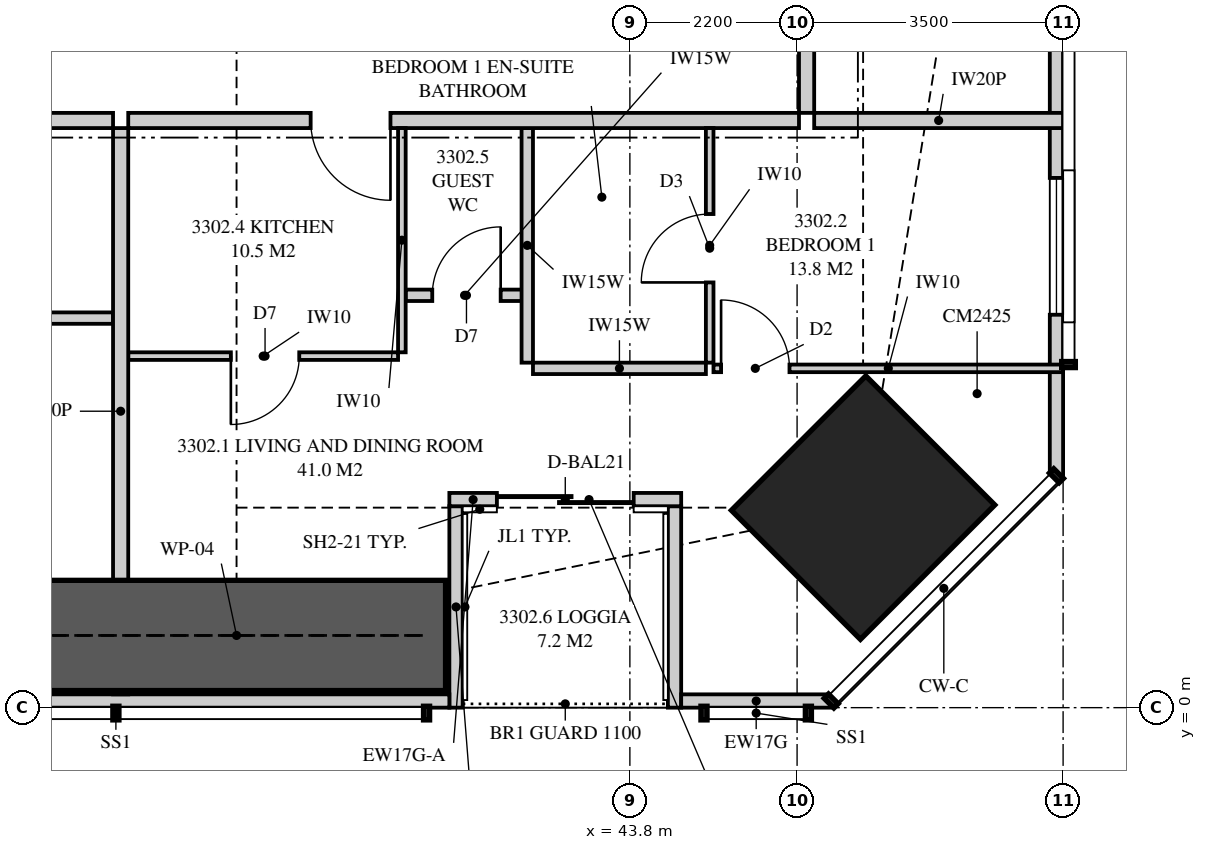
"""IFC4 building model, lengths in metres.
Left out: names, types, materials, properties, quantities, classifications, styles, units other than length and angle.
Written with IfcOpenShell. Run it as: python <this file> out.ifc"""

import sys

from ifc_helpers import new_model, si_unit, direction, frame, frame_2d, origin, origin_2d, place, context, subcontext, project, spatial, polyline, rectangle, outline, extrude, element, fill, save


model = new_model("IFC4")
c1 = context("Model", 3, precision=1e-05, world=origin(), true_north=direction((0.0, 1.0)))
c2 = subcontext(c1, "Body", "Model", "MODEL_VIEW")
j1 = project(units=[si_unit("LENGTHUNIT", "METRE"), si_unit("PLANEANGLEUNIT", "RADIAN")], contexts=[c1])
p1 = place(None, origin())
s1 = spatial("IfcSite", under=j1, at=p1, CompositionType="ELEMENT")
p2 = place(p1, origin())
s2 = spatial("IfcBuilding", under=s1, at=p2, CompositionType="ELEMENT")
p3 = place(p2, frame((0.0, 0.0, 121.6)))
s3 = spatial("IfcBuildingStorey", under=s2, at=p3, CompositionType="ELEMENT", Elevation=121.6)
p4 = place(p3, frame((46.869, 2.631, 0.0), z_axis=(0.0, 0.0, 1.0), x_axis=(-0.707106781187, 0.707106781187, 0.0)))
e1 = element("IfcColumn", 1, at=p4, inside=s3, PredefinedType="COLUMN", context=c2, shape_type="SweptSolid", body=[
    extrude(rectangle(XDim=2.4, YDim=2.5, at=origin_2d()), origin(), (0.0, 0.0, 1.0), 3.35),
])
p5 = place(p3, frame((14.051, 0.087, 0.0), z_axis=(0.0, 0.0, 1.0), x_axis=(1.0, 0.0, 0.0)))
e2 = element("IfcWall", 2, at=p5, inside=s3, PredefinedType="SOLIDWALL", context=c2, shape_type="SweptSolid", body=[
    extrude(outline(polyline([(0.0, 0.0), (27.374, 0.0), (27.374, 3.11), (24.777, 3.11), (24.777, 2.15), (24.732, 2.15), (24.732, 3.11), (24.574, 3.11), (24.574, 2.15), (2.824, 2.15), (2.824, 3.11), (2.666, 3.11), (2.666, 2.15), (2.62, 2.15), (2.62, 3.11), (0.0, 3.11), (0.0, 0.0)])), frame((0.0, 0.087, 0.0), z_axis=(0.0, -1.0, 0.0), x_axis=(1.0, 0.0, 0.0)), (0.0, 0.0, 1.0), 0.175),
])
p6 = place(p5, frame((5.874, 0.0, 0.4)))
e3 = element("IfcOpeningElement", 3, at=p6, cuts=e2, PredefinedType="OPENING", context=c2, shape_type="SweptSolid", body=[
    extrude(rectangle(XDim=1.8, YDim=1.7, at=frame_2d((0.9, 0.85))), frame((0.0, 0.097, 0.0), z_axis=(0.0, -1.0, 0.0), x_axis=(1.0, 0.0, 0.0)), (0.0, 0.0, 1.0), 0.195),
])
p7 = place(p5, frame((9.04, 0.0, 0.4)))
e4 = element("IfcOpeningElement", 4, at=p7, cuts=e2, PredefinedType="OPENING", context=c2, shape_type="SweptSolid", body=[
    extrude(rectangle(XDim=1.8, YDim=1.7, at=frame_2d((0.9, 0.85))), frame((0.0, 0.097, 0.0), z_axis=(0.0, -1.0, 0.0), x_axis=(1.0, 0.0, 0.0)), (0.0, 0.0, 1.0), 0.195),
])
p8 = place(p5, frame((16.564, 0.0, 0.4)))
e5 = element("IfcOpeningElement", 5, at=p8, cuts=e2, PredefinedType="OPENING", context=c2, shape_type="SweptSolid", body=[
    extrude(rectangle(XDim=1.8, YDim=1.7, at=frame_2d((0.9, 0.85))), frame((0.0, 0.097, 0.0), z_axis=(0.0, -1.0, 0.0), x_axis=(1.0, 0.0, 0.0)), (0.0, 0.0, 1.0), 0.195),
])
p9 = place(p5, frame((19.889, 0.0, 0.4)))
e6 = element("IfcOpeningElement", 6, at=p9, cuts=e2, PredefinedType="OPENING", context=c2, shape_type="SweptSolid", body=[
    extrude(rectangle(XDim=1.8, YDim=1.7, at=frame_2d((0.9, 0.85))), frame((0.0, 0.097, 0.0), z_axis=(0.0, -1.0, 0.0), x_axis=(1.0, 0.0, 0.0)), (0.0, 0.0, 1.0), 0.195),
])
p10 = place(p3, frame((44.475, 0.087, 0.0), z_axis=(0.0, 0.0, 1.0), x_axis=(1.0, 0.0, 0.0)))
e7 = element("IfcWall", 7, at=p10, inside=s3, PredefinedType="SOLIDWALL", context=c2, shape_type="SweptSolid", body=[
    extrude(rectangle(XDim=1.974, YDim=0.175, at=frame_2d((0.987, 0.0))), origin(), (0.0, 0.0, 1.0), 3.11),
])
p11 = place(p3, frame((41.425, 2.738, 0.0), z_axis=(0.0, 0.0, 1.0), x_axis=(1.0, 0.0, 0.0)))
e8 = element("IfcWall", 8, at=p11, inside=s3, PredefinedType="SOLIDWALL", context=c2, shape_type="SweptSolid", body=[
    extrude(rectangle(XDim=0.625, YDim=0.175, at=frame_2d((0.312, 0.0))), origin(), (0.0, 0.0, 1.0), 2.51),
])
p12 = place(p3, frame((42.05, 2.738, 0.0), z_axis=(0.0, 0.0, 1.0), x_axis=(1.0, 0.0, 0.0)))
e9 = element("IfcWall", 9, at=p12, inside=s3, PredefinedType="SOLIDWALL", context=c2, shape_type="SweptSolid", body=[
    extrude(rectangle(XDim=2.425, YDim=0.175, at=frame_2d((1.212, 0.0))), origin(), (0.0, 0.0, 1.0), 2.15),
])
p13 = place(p12, origin())
e10 = element("IfcOpeningElement", 10, at=p13, cuts=e9, PredefinedType="OPENING", context=c2, shape_type="SweptSolid", body=[
    extrude(rectangle(XDim=1.8, YDim=2.1, at=frame_2d((0.9, 1.05))), frame((0.0, 0.097, 0.0), z_axis=(0.0, -1.0, 0.0), x_axis=(1.0, 0.0, 0.0)), (0.0, 0.0, 1.0), 0.195),
])
p14 = place(p3, frame((41.512, 0.0, 0.0), z_axis=(0.0, 0.0, 1.0), x_axis=(0.0, 1.0, 0.0)))
e11 = element("IfcWall", 11, at=p14, inside=s3, PredefinedType="SOLIDWALL", context=c2, shape_type="SweptSolid", body=[
    extrude(outline(polyline([(0.0, 0.0), (2.65, 0.0), (2.65, 2.51), (2.373, 2.51), (2.373, 2.15), (0.705, 2.15), (0.705, 3.11), (0.0, 3.11), (0.0, 0.0)])), frame((0.0, 0.087, 0.0), z_axis=(0.0, -1.0, 0.0), x_axis=(1.0, 0.0, 0.0)), (0.0, 0.0, 1.0), 0.175),
])
p15 = place(p3, frame((44.387, 0.0, 0.0), z_axis=(0.0, 0.0, 1.0), x_axis=(0.0, 1.0, 0.0)))
e12 = element("IfcWall", 12, at=p15, inside=s3, PredefinedType="SOLIDWALL", context=c2, shape_type="SweptSolid", body=[
    extrude(outline(polyline([(0.0, 0.0), (2.65, 0.0), (2.65, 2.15), (1.291, 2.15), (1.291, 3.11), (0.0, 3.11), (0.0, 0.0)])), frame((0.0, 0.087, 0.0), z_axis=(0.0, -1.0, 0.0), x_axis=(1.0, 0.0, 0.0)), (0.0, 0.0, 1.0), 0.175),
])
p16 = place(p3, frame((49.413, 3.051, 0.0), z_axis=(0.0, 0.0, 1.0), x_axis=(0.0, 1.0, 0.0)))
e13 = element("IfcWall", 13, at=p16, inside=s3, PredefinedType="SOLIDWALL", context=c2, shape_type="SweptSolid", body=[
    extrude(outline(polyline([(0.0, 0.0), (31.897, 0.0), (31.897, 3.11), (22.167, 3.11), (22.167, 2.15), (22.074, 2.15), (22.074, 3.11), (21.949, 3.11), (21.949, 2.15), (9.949, 2.15), (9.949, 3.11), (9.823, 3.11), (9.823, 2.15), (9.73, 2.15), (9.73, 3.11), (0.0, 3.11), (0.0, 0.0)])), frame((0.0, 0.087, 0.0), z_axis=(0.0, -1.0, 0.0), x_axis=(1.0, 0.0, 0.0)), (0.0, 0.0, 1.0), 0.175),
])
p17 = place(p16, frame((2.118, 0.0, 0.4)))
e14 = element("IfcOpeningElement", 14, at=p17, cuts=e13, PredefinedType="OPENING", context=c2, shape_type="SweptSolid", body=[
    extrude(rectangle(XDim=1.8, YDim=1.7, at=frame_2d((0.9, 0.85))), frame((0.0, 0.097, 0.0), z_axis=(0.0, -1.0, 0.0), x_axis=(1.0, 0.0, 0.0)), (0.0, 0.0, 1.0), 0.195),
])
p18 = place(p16, frame((14.849, 0.0, 0.4)))
e15 = element("IfcOpeningElement", 15, at=p18, cuts=e13, PredefinedType="OPENING", context=c2, shape_type="SweptSolid", body=[
    extrude(rectangle(XDim=1.2, YDim=1.7, at=frame_2d((0.6, 0.85))), frame((0.0, 0.097, 0.0), z_axis=(0.0, -1.0, 0.0), x_axis=(1.0, 0.0, 0.0)), (0.0, 0.0, 1.0), 0.195),
])
p19 = place(p16, frame((27.479, 0.0, 0.4)))
e16 = element("IfcOpeningElement", 16, at=p19, cuts=e13, PredefinedType="OPENING", context=c2, shape_type="SweptSolid", body=[
    extrude(rectangle(XDim=1.8, YDim=1.7, at=frame_2d((0.9, 0.85))), frame((0.0, 0.097, 0.0), z_axis=(0.0, -1.0, 0.0), x_axis=(1.0, 0.0, 0.0)), (0.0, 0.0, 1.0), 0.195),
])
p20 = place(p3, frame((37.1, 0.175, 0.0), z_axis=(0.0, 0.0, 1.0), x_axis=(0.0, 1.0, 0.0)))
e17 = element("IfcWall", 17, at=p20, inside=s3, PredefinedType="PARTITIONING", context=c2, shape_type="SweptSolid", body=[
    extrude(outline(polyline([(0.529, 2.15), (0.0, 2.15), (0.0, 0.0), (0.529, 0.0), (0.529, 0.461), (1.021, 0.461), (1.021, 0.0), (7.45, 0.0), (7.45, 3.11), (1.685, 3.11), (1.685, 2.15), (1.021, 2.15), (1.021, 1.688), (0.529, 1.688), (0.529, 2.15)])), frame((0.0, 0.1, 0.0), z_axis=(0.0, -1.0, 0.0), x_axis=(1.0, 0.0, 0.0)), (0.0, 0.0, 1.0), 0.2),
])
p21 = place(p3, frame((17.775, 7.725, 0.0), z_axis=(0.0, 0.0, 1.0), x_axis=(1.0, 0.0, 0.0)))
e18 = element("IfcWall", 18, at=p21, inside=s3, PredefinedType="PARTITIONING", context=c2, shape_type="SweptSolid", body=[
    extrude(outline(polyline([(0.0, 0.0), (19.225, 0.0), (19.225, 3.11), (10.312, 3.11), (10.312, 2.541), (9.638, 2.541), (9.638, 3.11), (0.0, 3.11), (0.0, 0.0)])), frame((0.0, 0.1, 0.0), z_axis=(0.0, -1.0, 0.0), x_axis=(1.0, 0.0, 0.0)), (0.0, 0.0, 1.0), 0.2),
])
p22 = place(p21, frame((3.275, 0.0, 0.0)))
e19 = element("IfcOpeningElement", 19, at=p22, cuts=e18, PredefinedType="OPENING", context=c2, shape_type="SweptSolid", body=[
    extrude(rectangle(XDim=1.05, YDim=2.2, at=frame_2d((0.525, 1.1))), frame((0.0, 0.11, 0.0), z_axis=(0.0, -1.0, 0.0), x_axis=(1.0, 0.0, 0.0)), (0.0, 0.0, 1.0), 0.22),
])
p23 = place(p3, frame((32.95, 5.125, 0.0), z_axis=(0.0, 0.0, 1.0), x_axis=(1.0, 0.0, 0.0)))
e20 = element("IfcWall", 20, at=p23, inside=s3, PredefinedType="PLUMBINGWALL", context=c2, shape_type="SweptSolid", body=[
    extrude(rectangle(XDim=4.05, YDim=0.15, at=frame_2d((2.025, 0.0))), origin(), (0.0, 0.0, 1.0), 3.11),
])
p24 = place(p23, frame((0.4, 0.0, 0.0)))
e21 = element("IfcOpeningElement", 21, at=p24, cuts=e20, PredefinedType="OPENING", context=c2, shape_type="SweptSolid", body=[
    extrude(rectangle(XDim=0.9, YDim=2.1, at=frame_2d((0.45, 1.05))), frame((0.0, 0.085, 0.0), z_axis=(0.0, -1.0, 0.0), x_axis=(1.0, 0.0, 0.0)), (0.0, 0.0, 1.0), 0.17),
])
p25 = place(p3, frame((37.2, 7.725, 0.0), z_axis=(0.0, 0.0, 1.0), x_axis=(1.0, 0.0, 0.0)))
e22 = element("IfcWall", 22, at=p25, inside=s3, PredefinedType="PARTITIONING", context=c2, shape_type="SweptSolid", body=[
    extrude(outline(polyline([(0.0, 0.0), (8.825, 0.0), (8.825, 3.11), (1.762, 3.11), (1.762, 2.541), (1.088, 2.541), (1.088, 3.11), (0.0, 3.11), (0.0, 0.0)])), frame((0.0, 0.1, 0.0), z_axis=(0.0, -1.0, 0.0), x_axis=(1.0, 0.0, 0.0)), (0.0, 0.0, 1.0), 0.2),
])
p26 = place(p25, frame((2.4, 0.0, 0.0)))
e23 = element("IfcOpeningElement", 23, at=p26, cuts=e22, PredefinedType="OPENING", context=c2, shape_type="SweptSolid", body=[
    extrude(rectangle(XDim=1.05, YDim=2.2, at=frame_2d((0.525, 1.1))), frame((0.0, 0.11, 0.0), z_axis=(0.0, -1.0, 0.0), x_axis=(1.0, 0.0, 0.0)), (0.0, 0.0, 1.0), 0.22),
])
p27 = place(p3, frame((44.85, 4.539, 0.0), z_axis=(0.0, 0.0, 1.0), x_axis=(0.0, 1.0, 0.0)))
e24 = element("IfcWall", 24, at=p27, inside=s3, PredefinedType="PARTITIONING", context=c2, shape_type="SweptSolid", body=[
    extrude(rectangle(XDim=3.086, YDim=0.1, at=frame_2d((1.543, 0.0))), origin(), (0.0, 0.0, 1.0), 3.11),
])
p28 = place(p27, frame((1.056, 0.0, 0.0)))
e25 = element("IfcOpeningElement", 25, at=p28, cuts=e24, PredefinedType="OPENING", context=c2, shape_type="SweptSolid", body=[
    extrude(rectangle(XDim=0.9, YDim=2.1, at=frame_2d((0.45, 1.05))), frame((0.0, 0.06, 0.0), z_axis=(0.0, -1.0, 0.0), x_axis=(1.0, 0.0, 0.0)), (0.0, 0.0, 1.0), 0.12),
])
p29 = place(p3, frame((44.9, 4.464, 0.0), z_axis=(0.0, 0.0, 1.0), x_axis=(1.0, 0.0, 0.0)))
e26 = element("IfcWall", 26, at=p29, inside=s3, PredefinedType="PARTITIONING", context=c2, shape_type="SweptSolid", body=[
    extrude(outline(polyline([(0.0, 0.0), (4.6, 0.0), (4.6, 3.11), (3.137, 3.11), (3.137, 2.15), (1.395, 2.15), (1.395, 3.11), (0.0, 3.11), (0.0, 0.0)])), frame((0.0, 0.05, 0.0), z_axis=(0.0, -1.0, 0.0), x_axis=(1.0, 0.0, 0.0)), (0.0, 0.0, 1.0), 0.1),
])
p30 = place(p29, frame((0.1, 0.0, 0.0)))
e27 = element("IfcOpeningElement", 27, at=p30, cuts=e26, PredefinedType="OPENING", context=c2, shape_type="SweptSolid", body=[
    extrude(rectangle(XDim=0.9, YDim=2.1, at=frame_2d((0.45, 1.05))), frame((0.0, 0.06, 0.0), z_axis=(0.0, -1.0, 0.0), x_axis=(1.0, 0.0, 0.0)), (0.0, 0.0, 1.0), 0.12),
])
p31 = place(p3, frame((42.525, 4.464, 0.0), z_axis=(0.0, 0.0, 1.0), x_axis=(1.0, 0.0, 0.0)))
e28 = element("IfcWall", 28, at=p31, inside=s3, PredefinedType="PLUMBINGWALL", context=c2, shape_type="SweptSolid", body=[
    extrude(rectangle(XDim=2.275, YDim=0.15, at=frame_2d((1.138, 0.0))), origin(), (0.0, 0.0, 1.0), 3.11),
])
p32 = place(p3, frame((42.45, 4.539, 0.0), z_axis=(0.0, 0.0, 1.0), x_axis=(0.0, 1.0, 0.0)))
e29 = element("IfcWall", 29, at=p32, inside=s3, PredefinedType="PLUMBINGWALL", context=c2, shape_type="SweptSolid", body=[
    extrude(rectangle(XDim=3.086, YDim=0.15, at=frame_2d((1.543, 0.0))), origin(), (0.0, 0.0, 1.0), 3.11),
])
p33 = place(p3, frame((37.2, 4.625, 0.0), z_axis=(0.0, 0.0, 1.0), x_axis=(1.0, 0.0, 0.0)))
e30 = element("IfcWall", 30, at=p33, inside=s3, PredefinedType="PARTITIONING", context=c2, shape_type="SweptSolid", body=[
    extrude(outline(polyline([(0.0, 0.0), (3.55, 0.0), (3.55, 3.11), (1.712, 3.11), (1.712, 2.541), (1.138, 2.541), (1.138, 3.11), (0.0, 3.11), (0.0, 0.0)])), frame((0.0, 0.05, 0.0), z_axis=(0.0, -1.0, 0.0), x_axis=(1.0, 0.0, 0.0)), (0.0, 0.0, 1.0), 0.1),
])
p34 = place(p33, frame((1.35, 0.0, 0.0)))
e31 = element("IfcOpeningElement", 31, at=p34, cuts=e30, PredefinedType="OPENING", context=c2, shape_type="SweptSolid", body=[
    extrude(rectangle(XDim=0.9, YDim=2.1, at=frame_2d((0.45, 1.05))), frame((0.0, 0.06, 0.0), z_axis=(0.0, -1.0, 0.0), x_axis=(1.0, 0.0, 0.0)), (0.0, 0.0, 1.0), 0.12),
])
p35 = place(p3, frame((40.8, 4.675, 0.0), z_axis=(0.0, 0.0, 1.0), x_axis=(0.0, 1.0, 0.0)))
e32 = element("IfcWall", 32, at=p35, inside=s3, PredefinedType="PARTITIONING", context=c2, shape_type="SweptSolid", body=[
    extrude(rectangle(XDim=2.95, YDim=0.1, at=frame_2d((1.475, 0.0))), origin(), (0.0, 0.0, 1.0), 3.11),
])
p36 = place(p3, frame((40.85, 5.425, 0.0), z_axis=(0.0, 0.0, 1.0), x_axis=(1.0, 0.0, 0.0)))
e33 = element("IfcWall", 33, at=p36, inside=s3, PredefinedType="PLUMBINGWALL", context=c2, shape_type="SweptSolid", body=[
    extrude(rectangle(XDim=1.55, YDim=0.15, at=frame_2d((0.775, 0.0))), origin(), (0.0, 0.0, 1.0), 3.11),
])
p37 = place(p36, frame((0.35, 0.0, 0.0)))
e34 = element("IfcOpeningElement", 34, at=p37, cuts=e33, PredefinedType="OPENING", context=c2, shape_type="SweptSolid", body=[
    extrude(rectangle(XDim=0.9, YDim=2.1, at=frame_2d((0.45, 1.05))), frame((0.0, 0.085, 0.0), z_axis=(0.0, -1.0, 0.0), x_axis=(1.0, 0.0, 0.0)), (0.0, 0.0, 1.0), 0.17),
])
p38 = place(p3, frame((46.225, 7.725, 0.0), z_axis=(0.0, 0.0, 1.0), x_axis=(1.0, 0.0, 0.0)))
e35 = element("IfcWall", 35, at=p38, inside=s3, PredefinedType="PARTITIONING", context=c2, shape_type="SweptSolid", body=[
    extrude(outline(polyline([(0.0, 0.0), (3.275, 0.0), (3.275, 3.11), (2.392, 3.11), (2.392, 2.15), (0.643, 2.15), (0.643, 2.541), (0.306, 2.541), (0.306, 3.11), (0.0, 3.11), (0.0, 0.0)])), frame((0.0, 0.1, 0.0), z_axis=(0.0, -1.0, 0.0), x_axis=(1.0, 0.0, 0.0)), (0.0, 0.0, 1.0), 0.2),
])
p39 = place(p3, frame((46.125, 7.825, 0.0), z_axis=(0.0, 0.0, 1.0), x_axis=(0.0, 1.0, 0.0)))
e36 = element("IfcWall", 36, at=p39, inside=s3, PredefinedType="PARTITIONING", context=c2, shape_type="SweptSolid", body=[
    extrude(outline(polyline([(0.0, 0.0), (8.475, 0.0), (8.475, 3.11), (5.512, 3.11), (5.512, 2.541), (4.838, 2.541), (4.838, 3.11), (0.0, 3.11), (0.0, 0.0)])), frame((0.0, 0.1, 0.0), z_axis=(0.0, -1.0, 0.0), x_axis=(1.0, 0.0, 0.0)), (0.0, 0.0, 1.0), 0.2),
])
p40 = place(p3, frame((35.875, 0.95, 0.0), z_axis=(0.0, 0.0, 1.0), x_axis=(1.0, 0.0, 0.0)))
e37 = element("IfcWall", 37, at=p40, inside=s3, PredefinedType="SHEAR", context=c2, shape_type="SweptSolid", body=[
    extrude(rectangle(XDim=5.5, YDim=1.45, at=frame_2d((2.75, 0.0))), origin(), (0.0, 0.0, 1.0), 3.35),
])
p41 = place(p13, origin())
e38 = element("IfcDoor", 38, at=p41, inside=s3, OperationType="SLIDING_TO_LEFT", PredefinedType="DOOR", context=c2, shape_type="SweptSolid", body=[
    extrude(rectangle(XDim=1.8, YDim=2.1, at=frame_2d((0.9, 1.05))), frame((0.0, 0.025, 0.0), z_axis=(0.0, -1.0, 0.0), x_axis=(1.0, 0.0, 0.0)), (0.0, 0.0, 1.0), 0.05),
])
fill(e10, e38)
p42 = place(p17, origin())
e39 = element("IfcWindow", 39, at=p42, inside=s3, PartitioningType="SINGLE_PANEL", PredefinedType="WINDOW", context=c2, shape_type="SweptSolid", body=[
    extrude(rectangle(XDim=1.8, YDim=1.7, at=frame_2d((0.9, 0.85))), frame((0.0, 0.03, 0.0), z_axis=(0.0, -1.0, 0.0), x_axis=(1.0, 0.0, 0.0)), (0.0, 0.0, 1.0), 0.06),
])
fill(e14, e39)
p43 = place(p26, frame((1.05, 0.0, 0.0), z_axis=(0.0, 0.0, 1.0), x_axis=(-1.0, 0.0, 0.0)))
e40 = element("IfcDoor", 40, at=p43, inside=s3, OperationType="SINGLE_SWING_LEFT", PredefinedType="DOOR", context=c2, shape_type="SweptSolid", body=[
    extrude(rectangle(XDim=1.05, YDim=2.2, at=frame_2d((0.525, 1.1))), frame((0.0, 0.025, 0.0), z_axis=(0.0, -1.0, 0.0), x_axis=(1.0, 0.0, 0.0)), (0.0, 0.0, 1.0), 0.05),
])
fill(e23, e40)
p44 = place(p30, origin())
e41 = element("IfcDoor", 41, at=p44, inside=s3, OperationType="SINGLE_SWING_LEFT", PredefinedType="DOOR", context=c2, shape_type="SweptSolid", body=[
    extrude(rectangle(XDim=0.9, YDim=2.1, at=frame_2d((0.45, 1.05))), frame((0.0, 0.025, 0.0), z_axis=(0.0, -1.0, 0.0), x_axis=(1.0, 0.0, 0.0)), (0.0, 0.0, 1.0), 0.05),
])
fill(e27, e41)
p45 = place(p28, origin())
e42 = element("IfcDoor", 42, at=p45, inside=s3, OperationType="SINGLE_SWING_LEFT", PredefinedType="DOOR", context=c2, shape_type="SweptSolid", body=[
    extrude(rectangle(XDim=0.9, YDim=2.1, at=frame_2d((0.45, 1.05))), frame((0.0, 0.025, 0.0), z_axis=(0.0, -1.0, 0.0), x_axis=(1.0, 0.0, 0.0)), (0.0, 0.0, 1.0), 0.05),
])
fill(e25, e42)
p46 = place(p34, frame((0.9, 0.0, 0.0), z_axis=(0.0, 0.0, 1.0), x_axis=(-1.0, 0.0, 0.0)))
e43 = element("IfcDoor", 43, at=p46, inside=s3, OperationType="SINGLE_SWING_RIGHT", PredefinedType="DOOR", context=c2, shape_type="SweptSolid", body=[
    extrude(rectangle(XDim=0.9, YDim=2.1, at=frame_2d((0.45, 1.05))), frame((0.0, 0.025, 0.0), z_axis=(0.0, -1.0, 0.0), x_axis=(1.0, 0.0, 0.0)), (0.0, 0.0, 1.0), 0.05),
])
fill(e31, e43)
p47 = place(p37, origin())
e44 = element("IfcDoor", 44, at=p47, inside=s3, OperationType="SINGLE_SWING_RIGHT", PredefinedType="DOOR", context=c2, shape_type="SweptSolid", body=[
    extrude(rectangle(XDim=0.9, YDim=2.1, at=frame_2d((0.45, 1.05))), frame((0.0, 0.025, 0.0), z_axis=(0.0, -1.0, 0.0), x_axis=(1.0, 0.0, 0.0)), (0.0, 0.0, 1.0), 0.05),
])
fill(e34, e44)
save(model, sys.argv[1])
